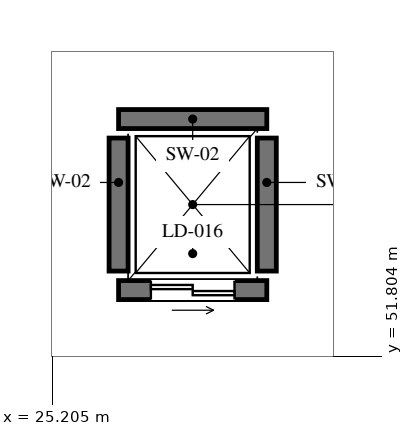
"""IFC4 building model, lengths in metres.
Left out: names, types, materials, properties, quantities, classifications, styles, units other than length and angle.
Written with IfcOpenShell. Run it as: python <this file> out.ifc"""

import sys

from ifc_helpers import new_model, si_unit, direction, frame, frame_2d, origin, place, context, subcontext, project, spatial, rectangle, extrude, element, fill, save


model = new_model("IFC4")
c1 = context("Model", 3, precision=1e-05, world=origin(), true_north=direction((0.0, 1.0)))
c2 = subcontext(c1, "Body", "Model", "MODEL_VIEW")
j1 = project(units=[si_unit("LENGTHUNIT", "METRE"), si_unit("PLANEANGLEUNIT", "RADIAN")], contexts=[c1])
p1 = place(None, origin())
s1 = spatial("IfcSite", under=j1, at=p1, CompositionType="ELEMENT")
p2 = place(p1, origin())
s2 = spatial("IfcBuilding", under=s1, at=p2, CompositionType="ELEMENT")
p3 = place(p2, frame((0.0, 0.0, 5.85)))
s3 = spatial("IfcBuildingStorey", under=s2, at=p3, CompositionType="ELEMENT", Elevation=5.85)
p4 = place(p3, frame((26.075, 52.675, 0.0), z_axis=(0.0, 0.0, 1.0), x_axis=(1.0, 0.0, 0.0)))
e1 = element("IfcWall", 1, at=p4, inside=s3, PredefinedType="SHEAR", context=c2, shape_type="SweptSolid", body=[
    extrude(rectangle(XDim=1.95, YDim=0.25, at=frame_2d((0.975, 0.0))), origin(), (0.0, 0.0, 1.0), 4.0),
])
p5 = place(p4, frame((0.425, 0.0, 0.0)))
e2 = element("IfcOpeningElement", 2, at=p5, cuts=e1, PredefinedType="OPENING", context=c2, shape_type="SweptSolid", body=[
    extrude(rectangle(XDim=1.1, YDim=2.15, at=frame_2d((0.55, 1.075))), frame((0.0, 0.135, 0.0), z_axis=(0.0, -1.0, 0.0), x_axis=(1.0, 0.0, 0.0)), (0.0, 0.0, 1.0), 0.27),
])
p6 = place(p3, frame((26.075, 54.925, 0.0), z_axis=(0.0, 0.0, 1.0), x_axis=(1.0, 0.0, 0.0)))
e3 = element("IfcWall", 3, at=p6, inside=s3, PredefinedType="SHEAR", context=c2, shape_type="SweptSolid", body=[
    extrude(rectangle(XDim=1.95, YDim=0.25, at=frame_2d((0.975, 0.0))), origin(), (0.0, 0.0, 1.0), 4.0),
])
for number, where, z_axis, x_axis in (
    (4, (26.075, 52.925, 0.0), (0.0, 0.0, 1.0), (0.0, 1.0, 0.0)),
    (5, (28.025, 52.925, 0.0), (0.0, 0.0, 1.0), (0.0, 1.0, 0.0)),
):
    element("IfcWall", number, at=place(p3, frame(where, z_axis=z_axis, x_axis=x_axis)), inside=s3, PredefinedType="SHEAR", context=c2, shape_type="SweptSolid", body=[
        extrude(rectangle(XDim=1.75, YDim=0.25, at=frame_2d((0.875, 0.0))), origin(), (0.0, 0.0, 1.0), 4.0),
    ])
p7 = place(p5, origin())
e6 = element("IfcDoor", 6, at=p7, inside=s3, OperationType="DOUBLE_DOOR_SLIDING", PredefinedType="DOOR", context=c2, shape_type="SweptSolid", body=[
    extrude(rectangle(XDim=1.1, YDim=2.15, at=frame_2d((0.55, 1.075))), frame((0.0, 0.025, 0.0), z_axis=(0.0, -1.0, 0.0), x_axis=(1.0, 0.0, 0.0)), (0.0, 0.0, 1.0), 0.05),
])
fill(e2, e6)
save(model, sys.argv[1])
